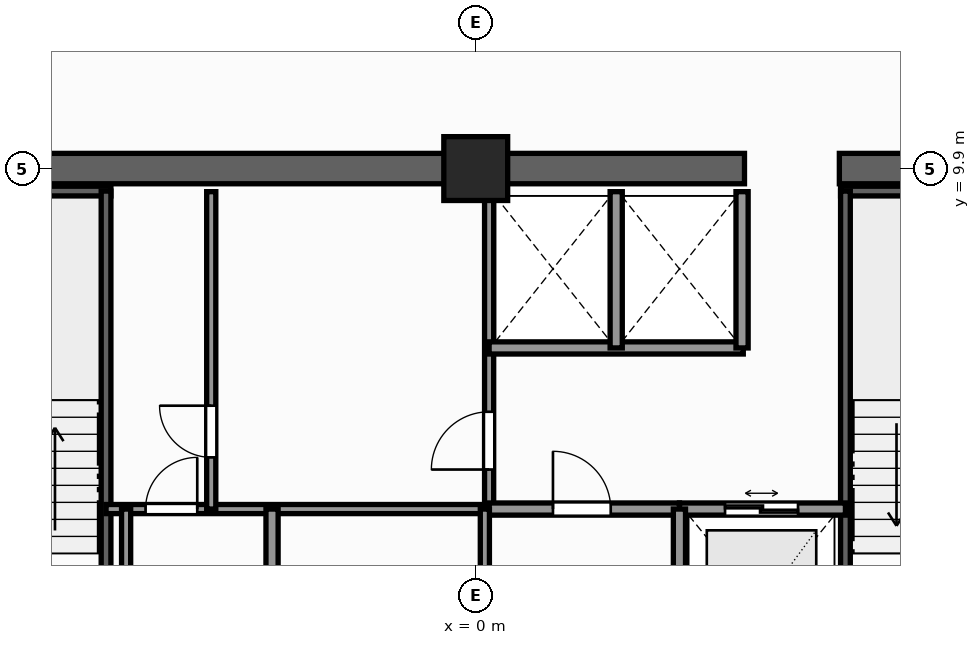
"""IFC4 building model, lengths in metres.
Left out: names, types, materials, properties, quantities, classifications, styles, units other than length and angle.
Written with IfcOpenShell. Run it as: python <this file> out.ifc"""

import sys

from ifc_helpers import new_model, si_unit, direction, frame, frame_2d, origin, origin_2d, place, context, subcontext, project, spatial, rectangle, extrude, element, fill, save


model = new_model("IFC4")
c1 = context("Model", 3, precision=1e-05, world=origin(), true_north=direction((0.0, 1.0)))
c2 = subcontext(c1, "Body", "Model", "MODEL_VIEW")
j1 = project(units=[si_unit("LENGTHUNIT", "METRE"), si_unit("PLANEANGLEUNIT", "RADIAN")], contexts=[c1])
p1 = place(None, origin())
s1 = spatial("IfcSite", under=j1, at=p1, CompositionType="ELEMENT")
p2 = place(p1, origin())
s2 = spatial("IfcBuilding", under=s1, at=p2, CompositionType="ELEMENT")
p3 = place(p2, frame((0.0, 0.0, 199.8)))
s3 = spatial("IfcBuildingStorey", under=s2, at=p3, CompositionType="ELEMENT", Elevation=199.8)
p4 = place(p3, frame((-10.15, 9.9, 0.0), z_axis=(0.0, 0.0, 1.0), x_axis=(1.0, 0.0, 0.0)))
e1 = element("IfcWall", 1, at=p4, inside=s3, PredefinedType="SHEAR", context=c2, shape_type="SweptSolid", body=[
    extrude(rectangle(XDim=14.57, YDim=0.5, at=frame_2d((7.285, 0.0))), origin(), (0.0, 0.0, 1.0), 3.3),
])
p5 = place(p3, frame((5.98, 9.9, 0.0), z_axis=(0.0, 0.0, 1.0), x_axis=(1.0, 0.0, 0.0)))
e2 = element("IfcWall", 2, at=p5, inside=s3, PredefinedType="SHEAR", context=c2, shape_type="SweptSolid", body=[
    extrude(rectangle(XDim=4.17, YDim=0.5, at=frame_2d((2.085, 0.0))), origin(), (0.0, 0.0, 1.0), 3.3),
])
p6 = place(p3, frame((0.0, 9.9, 0.0), z_axis=(0.0, 0.0, 1.0), x_axis=(1.0, 0.0, 0.0)))
e3 = element("IfcColumn", 3, at=p6, inside=s3, PredefinedType="COLUMN", context=c2, shape_type="SweptSolid", body=[
    extrude(rectangle(XDim=1.05, YDim=1.05, at=origin_2d()), origin(), (0.0, 0.0, 1.0), 3.3),
])
p7 = place(p3, frame((-9.52, 9.53, 0.0), z_axis=(0.0, 0.0, 1.0), x_axis=(1.0, 0.0, 0.0)))
e4 = element("IfcWall", 4, at=p7, inside=s3, PredefinedType="SHEAR", context=c2, shape_type="SweptSolid", body=[
    extrude(rectangle(XDim=3.52, YDim=0.16, at=frame_2d((1.76, 0.0))), origin(), (0.0, 0.0, 1.0), 3.3),
])
p8 = place(p3, frame((-6.08, 1.97, 0.0), z_axis=(0.0, 0.0, 1.0), x_axis=(0.0, 1.0, 0.0)))
e5 = element("IfcWall", 5, at=p8, inside=s3, PredefinedType="SHEAR", context=c2, shape_type="SweptSolid", body=[
    extrude(rectangle(XDim=7.56, YDim=0.16, at=frame_2d((3.78, 0.0))), origin(), (0.0, 0.0, 1.0), 3.3),
])
p9 = place(p3, frame((6.0, 9.53, 0.0), z_axis=(0.0, 0.0, 1.0), x_axis=(1.0, 0.0, 0.0)))
e6 = element("IfcWall", 6, at=p9, inside=s3, PredefinedType="SHEAR", context=c2, shape_type="SweptSolid", body=[
    extrude(rectangle(XDim=3.52, YDim=0.16, at=frame_2d((1.76, 0.0))), origin(), (0.0, 0.0, 1.0), 3.3),
])
p10 = place(p3, frame((6.08, 1.97, 0.0), z_axis=(0.0, 0.0, 1.0), x_axis=(0.0, 1.0, 0.0)))
e7 = element("IfcWall", 7, at=p10, inside=s3, PredefinedType="SHEAR", context=c2, shape_type="SweptSolid", body=[
    extrude(rectangle(XDim=7.56, YDim=0.16, at=frame_2d((3.78, 0.0))), origin(), (0.0, 0.0, 1.0), 3.3),
])
p11 = place(p3, frame((3.35, 4.3, 0.0), z_axis=(0.0, 0.0, 1.0), x_axis=(1.0, 0.0, 0.0)))
e8 = element("IfcWall", 8, at=p11, inside=s3, PredefinedType="SOLIDWALL", context=c2, shape_type="SweptSolid", body=[
    extrude(rectangle(XDim=2.73, YDim=0.2, at=frame_2d((1.365, 0.0))), origin(), (0.0, 0.0, 1.0), 3.08),
])
p12 = place(p11, frame((0.75, 0.0, 0.0)))
e9 = element("IfcOpeningElement", 9, at=p12, cuts=e8, PredefinedType="OPENING", context=c2, shape_type="SweptSolid", body=[
    extrude(rectangle(XDim=1.2, YDim=2.25, at=frame_2d((0.6, 1.125))), frame((0.0, 0.11, 0.0), z_axis=(0.0, -1.0, 0.0), x_axis=(1.0, 0.0, 0.0)), (0.0, 0.0, 1.0), 0.22),
])
p13 = place(p3, frame((-6.08, 4.3, 0.0), z_axis=(0.0, 0.0, 1.0), x_axis=(1.0, 0.0, 0.0)))
e10 = element("IfcWall", 10, at=p13, inside=s3, PredefinedType="PARTITIONING", context=c2, shape_type="SweptSolid", body=[
    extrude(rectangle(XDim=6.3, YDim=0.15, at=frame_2d((3.15, 0.0))), origin(), (0.0, 0.0, 1.0), 3.08),
])
p14 = place(p13, frame((0.65, 0.0, 0.0)))
e11 = element("IfcOpeningElement", 11, at=p14, cuts=e10, PredefinedType="OPENING", context=c2, shape_type="SweptSolid", body=[
    extrude(rectangle(XDim=0.85, YDim=2.03, at=frame_2d((0.425, 1.015))), frame((0.0, 0.085, 0.0), z_axis=(0.0, -1.0, 0.0), x_axis=(1.0, 0.0, 0.0)), (0.0, 0.0, 1.0), 0.17),
])
p15 = place(p3, frame((0.22, 4.3, 0.0), z_axis=(0.0, 0.0, 1.0), x_axis=(0.0, 1.0, 0.0)))
e12 = element("IfcWall", 12, at=p15, inside=s3, PredefinedType="PARTITIONING", context=c2, shape_type="SweptSolid", body=[
    extrude(rectangle(XDim=5.22, YDim=0.15, at=frame_2d((2.61, 0.0))), origin(), (0.0, 0.0, 1.0), 3.08),
])
p16 = place(p15, frame((0.65, 0.0, 0.0)))
e13 = element("IfcOpeningElement", 13, at=p16, cuts=e12, PredefinedType="OPENING", context=c2, shape_type="SweptSolid", body=[
    extrude(rectangle(XDim=0.95, YDim=2.06, at=frame_2d((0.475, 1.03))), frame((0.0, 0.085, 0.0), z_axis=(0.0, -1.0, 0.0), x_axis=(1.0, 0.0, 0.0)), (0.0, 0.0, 1.0), 0.17),
])
p17 = place(p3, frame((-4.35, 4.3, 0.0), z_axis=(0.0, 0.0, 1.0), x_axis=(0.0, 1.0, 0.0)))
e14 = element("IfcWall", 14, at=p17, inside=s3, PredefinedType="PARTITIONING", context=c2, shape_type="SweptSolid", body=[
    extrude(rectangle(XDim=5.22, YDim=0.15, at=frame_2d((2.61, 0.0))), origin(), (0.0, 0.0, 1.0), 3.08),
])
p18 = place(p17, frame((0.85, 0.0, 0.0)))
e15 = element("IfcOpeningElement", 15, at=p18, cuts=e14, PredefinedType="OPENING", context=c2, shape_type="SweptSolid", body=[
    extrude(rectangle(XDim=0.85, YDim=2.03, at=frame_2d((0.425, 1.015))), frame((0.0, 0.085, 0.0), z_axis=(0.0, -1.0, 0.0), x_axis=(1.0, 0.0, 0.0)), (0.0, 0.0, 1.0), 0.17),
])
p19 = place(p3, frame((0.22, 6.95, 0.0), z_axis=(0.0, 0.0, 1.0), x_axis=(1.0, 0.0, 0.0)))
e16 = element("IfcWall", 16, at=p19, inside=s3, PredefinedType="SOLIDWALL", context=c2, shape_type="SweptSolid", body=[
    extrude(rectangle(XDim=4.18, YDim=0.2, at=frame_2d((2.09, 0.0))), origin(), (0.0, 0.0, 1.0), 3.08),
])
for number, where, z_axis, x_axis in (
    (17, (4.38, 6.95, 0.0), (0.0, 0.0, 1.0), (0.0, 1.0, 0.0)),
    (18, (2.31, 6.95, 0.0), (0.0, 0.0, 1.0), (0.0, 1.0, 0.0)),
):
    element("IfcWall", number, at=place(p3, frame(where, z_axis=z_axis, x_axis=x_axis)), inside=s3, PredefinedType="SOLIDWALL", context=c2, shape_type="SweptSolid", body=[
        extrude(rectangle(XDim=2.57, YDim=0.2, at=frame_2d((1.285, 0.0))), origin(), (0.0, 0.0, 1.0), 3.08),
    ])
p20 = place(p3, frame((0.22, 4.3, 0.0), z_axis=(0.0, 0.0, 1.0), x_axis=(1.0, 0.0, 0.0)))
e19 = element("IfcWall", 19, at=p20, inside=s3, PredefinedType="SOLIDWALL", context=c2, shape_type="SweptSolid", body=[
    extrude(rectangle(XDim=3.13, YDim=0.2, at=frame_2d((1.565, 0.0))), origin(), (0.0, 0.0, 1.0), 3.08),
])
p21 = place(p20, frame((1.05, 0.0, 0.0)))
e20 = element("IfcOpeningElement", 20, at=p21, cuts=e19, PredefinedType="OPENING", context=c2, shape_type="SweptSolid", body=[
    extrude(rectangle(XDim=0.95, YDim=2.06, at=frame_2d((0.475, 1.03))), frame((0.0, 0.11, 0.0), z_axis=(0.0, -1.0, 0.0), x_axis=(1.0, 0.0, 0.0)), (0.0, 0.0, 1.0), 0.22),
])
for number, where, z_axis, x_axis in (
    (21, (-3.35, 1.1, 0.0), (0.0, 0.0, 1.0), (0.0, 1.0, 0.0)),
    (22, (3.35, 1.1, 0.0), (0.0, 0.0, 1.0), (0.0, 1.0, 0.0)),
):
    element("IfcWall", number, at=place(p3, frame(where, z_axis=z_axis, x_axis=x_axis)), inside=s3, PredefinedType="SOLIDWALL", context=c2, shape_type="SweptSolid", body=[
        extrude(rectangle(XDim=3.2, YDim=0.2, at=frame_2d((1.6, 0.0))), origin(), (0.0, 0.0, 1.0), 3.08),
    ])
p22 = place(p3, frame((0.15, -1.7, 0.0), z_axis=(0.0, 0.0, 1.0), x_axis=(0.0, 1.0, 0.0)))
e23 = element("IfcWall", 23, at=p22, inside=s3, PredefinedType="PARTITIONING", context=c2, shape_type="SweptSolid", body=[
    extrude(rectangle(XDim=6.0, YDim=0.15, at=frame_2d((3.0, 0.0))), origin(), (0.0, 0.0, 1.0), 3.08),
])
p23 = place(p22, frame((3.6, 0.0, 0.0)))
e24 = element("IfcOpeningElement", 24, at=p23, cuts=e23, PredefinedType="OPENING", context=c2, shape_type="SweptSolid", body=[
    extrude(rectangle(XDim=0.85, YDim=2.03, at=frame_2d((0.425, 1.015))), frame((0.0, 0.085, 0.0), z_axis=(0.0, -1.0, 0.0), x_axis=(1.0, 0.0, 0.0)), (0.0, 0.0, 1.0), 0.17),
])
p24 = place(p3, frame((-5.75, 1.97, 0.0), z_axis=(0.0, 0.0, 1.0), x_axis=(0.0, 1.0, 0.0)))
e25 = element("IfcWall", 25, at=p24, inside=s3, PredefinedType="PARTITIONING", context=c2, shape_type="SweptSolid", body=[
    extrude(rectangle(XDim=2.33, YDim=0.15, at=frame_2d((1.165, 0.0))), origin(), (0.0, 0.0, 1.0), 3.08),
])
p25 = place(p12, origin())
e26 = element("IfcDoor", 26, at=p25, inside=s3, OperationType="DOUBLE_DOOR_SLIDING", PredefinedType="DOOR", context=c2, shape_type="SweptSolid", body=[
    extrude(rectangle(XDim=1.2, YDim=2.25, at=frame_2d((0.6, 1.125))), frame((0.0, 0.025, 0.0), z_axis=(0.0, -1.0, 0.0), x_axis=(1.0, 0.0, 0.0)), (0.0, 0.0, 1.0), 0.05),
])
fill(e9, e26)
p26 = place(p16, origin())
e27 = element("IfcDoor", 27, at=p26, inside=s3, OperationType="SINGLE_SWING_LEFT", PredefinedType="DOOR", context=c2, shape_type="SweptSolid", body=[
    extrude(rectangle(XDim=0.95, YDim=2.06, at=frame_2d((0.475, 1.03))), frame((0.0, 0.025, 0.0), z_axis=(0.0, -1.0, 0.0), x_axis=(1.0, 0.0, 0.0)), (0.0, 0.0, 1.0), 0.05),
])
fill(e13, e27)
p27 = place(p18, origin())
e28 = element("IfcDoor", 28, at=p27, inside=s3, OperationType="SINGLE_SWING_RIGHT", PredefinedType="DOOR", context=c2, shape_type="SweptSolid", body=[
    extrude(rectangle(XDim=0.85, YDim=2.03, at=frame_2d((0.425, 1.015))), frame((0.0, 0.025, 0.0), z_axis=(0.0, -1.0, 0.0), x_axis=(1.0, 0.0, 0.0)), (0.0, 0.0, 1.0), 0.05),
])
fill(e15, e28)
p28 = place(p21, origin())
e29 = element("IfcDoor", 29, at=p28, inside=s3, OperationType="SINGLE_SWING_LEFT", PredefinedType="DOOR", context=c2, shape_type="SweptSolid", body=[
    extrude(rectangle(XDim=0.95, YDim=2.06, at=frame_2d((0.475, 1.03))), frame((0.0, 0.025, 0.0), z_axis=(0.0, -1.0, 0.0), x_axis=(1.0, 0.0, 0.0)), (0.0, 0.0, 1.0), 0.05),
])
fill(e20, e29)
p29 = place(p14, origin())
e30 = element("IfcDoor", 30, at=p29, inside=s3, OperationType="SINGLE_SWING_RIGHT", PredefinedType="DOOR", context=c2, shape_type="SweptSolid", body=[
    extrude(rectangle(XDim=0.85, YDim=2.03, at=frame_2d((0.425, 1.015))), frame((0.0, 0.025, 0.0), z_axis=(0.0, -1.0, 0.0), x_axis=(1.0, 0.0, 0.0)), (0.0, 0.0, 1.0), 0.05),
])
fill(e11, e30)
save(model, sys.argv[1])
